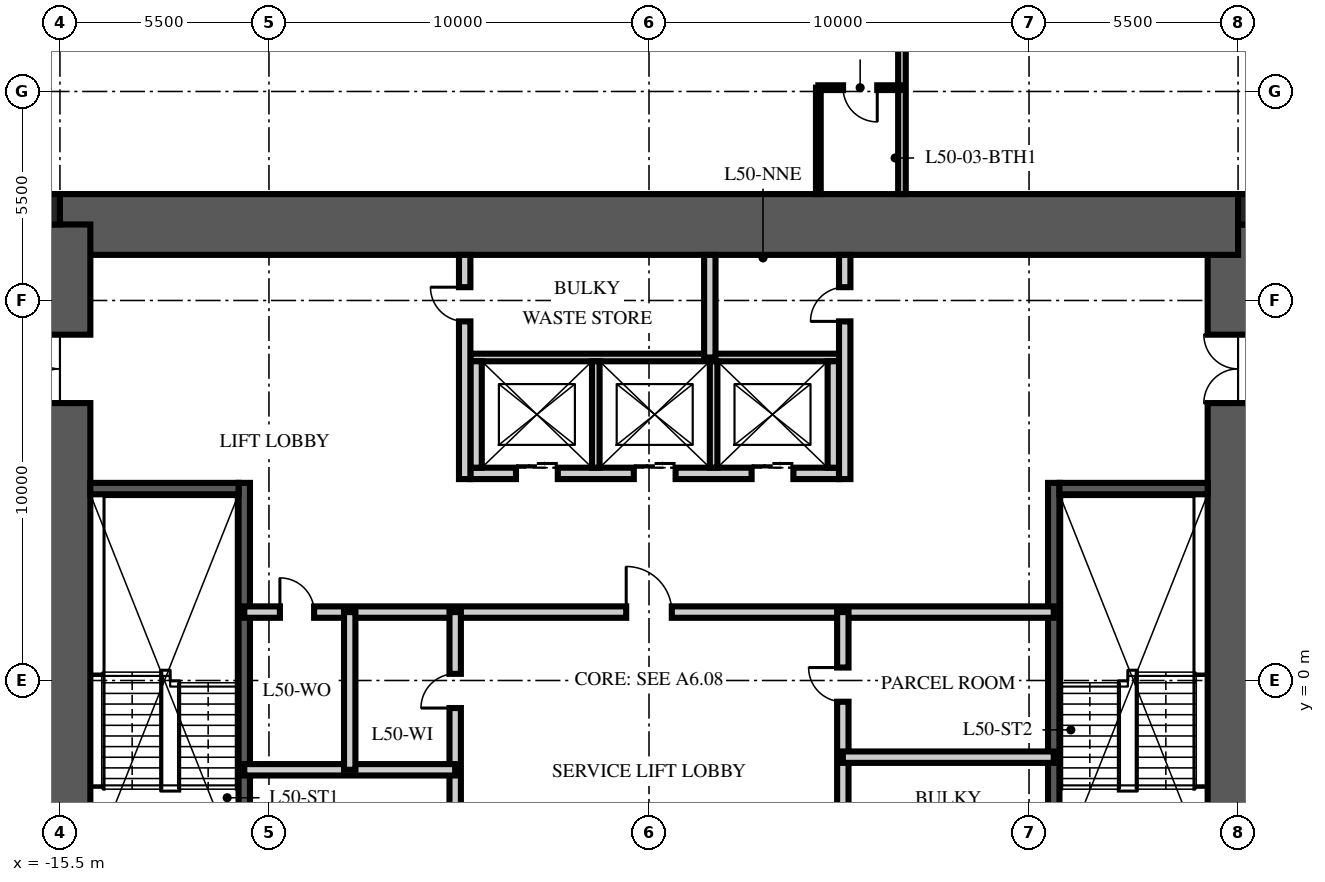
"""IFC4 building model, lengths in metres.
Left out: names, types, materials, properties, quantities, classifications, styles, units other than length and angle.
Written with IfcOpenShell. Run it as: python <this file> out.ifc"""

import sys

from ifc_helpers import new_model, si_unit, direction, frame, frame_2d, origin, origin_2d, place, context, subcontext, project, spatial, rectangle, extrude, element, fill, save


model = new_model("IFC4")
c1 = context("Model", 3, precision=1e-05, world=origin(), true_north=direction((0.0, 1.0)))
c2 = subcontext(c1, "Body", "Model", "MODEL_VIEW")
j1 = project(units=[si_unit("LENGTHUNIT", "METRE"), si_unit("PLANEANGLEUNIT", "RADIAN")], contexts=[c1])
p1 = place(None, origin())
s1 = spatial("IfcSite", under=j1, at=p1, CompositionType="ELEMENT")
p2 = place(p1, origin())
s2 = spatial("IfcBuilding", under=s1, at=p2, CompositionType="ELEMENT")
p3 = place(p2, frame((0.0, 0.0, 203.25)))
s3 = spatial("IfcBuildingStorey", under=s2, at=p3, CompositionType="ELEMENT", Elevation=203.25)
p4 = place(p3, frame((15.5, -12.0, -0.25), z_axis=(0.0, 0.0, 1.0), x_axis=(0.0, 1.0, 0.0)))
e1 = element("IfcWall", 1, at=p4, inside=s3, PredefinedType="SHEAR", context=c2, shape_type="SweptSolid", body=[
    extrude(rectangle(XDim=24.0, YDim=1.6, at=frame_2d((12.0, 0.0))), origin(), (0.0, 0.0, 1.0), 3.75),
])
p5 = place(p4, frame((3.2, 0.0, 0.25)))
e2 = element("IfcOpeningElement", 2, at=p5, cuts=e1, PredefinedType="OPENING", context=c2, shape_type="SweptSolid", body=[
    extrude(rectangle(XDim=1.2, YDim=2.1, at=frame_2d((0.6, 1.05))), frame((0.0, 0.81, 0.0), z_axis=(0.0, -1.0, 0.0), x_axis=(1.0, 0.0, 0.0)), (0.0, 0.0, 1.0), 1.62),
])
p6 = place(p4, frame((19.3, 0.0, 0.25)))
e3 = element("IfcOpeningElement", 3, at=p6, cuts=e1, PredefinedType="OPENING", context=c2, shape_type="SweptSolid", body=[
    extrude(rectangle(XDim=1.8, YDim=2.1, at=frame_2d((0.9, 1.05))), frame((0.0, 0.81, 0.0), z_axis=(0.0, -1.0, 0.0), x_axis=(1.0, 0.0, 0.0)), (0.0, 0.0, 1.0), 1.62),
])
p7 = place(p3, frame((-15.5, 12.0, -0.25), z_axis=(0.0, 0.0, 1.0), x_axis=(1.0, 0.0, 0.0)))
e4 = element("IfcWall", 4, at=p7, inside=s3, PredefinedType="SHEAR", context=c2, shape_type="SweptSolid", body=[
    extrude(rectangle(XDim=31.0, YDim=1.6, at=frame_2d((15.5, 0.0))), origin(), (0.0, 0.0, 1.0), 3.75),
])
p8 = place(p3, frame((-15.5, -12.0, -0.25), z_axis=(0.0, 0.0, 1.0), x_axis=(0.0, 1.0, 0.0)))
e5 = element("IfcWall", 5, at=p8, inside=s3, PredefinedType="SHEAR", context=c2, shape_type="SweptSolid", body=[
    extrude(rectangle(XDim=24.0, YDim=1.6, at=frame_2d((12.0, 0.0))), origin(), (0.0, 0.0, 1.0), 3.75),
])
p9 = place(p8, frame((3.2, 0.0, 0.25)))
e6 = element("IfcOpeningElement", 6, at=p9, cuts=e5, PredefinedType="OPENING", context=c2, shape_type="SweptSolid", body=[
    extrude(rectangle(XDim=1.2, YDim=2.1, at=frame_2d((0.6, 1.05))), frame((0.0, 0.81, 0.0), z_axis=(0.0, -1.0, 0.0), x_axis=(1.0, 0.0, 0.0)), (0.0, 0.0, 1.0), 1.62),
])
p10 = place(p8, frame((19.3, 0.0, 0.25)))
e7 = element("IfcOpeningElement", 7, at=p10, cuts=e5, PredefinedType="OPENING", context=c2, shape_type="SweptSolid", body=[
    extrude(rectangle(XDim=1.8, YDim=2.1, at=frame_2d((0.9, 1.05))), frame((0.0, 0.81, 0.0), z_axis=(0.0, -1.0, 0.0), x_axis=(1.0, 0.0, 0.0)), (0.0, 0.0, 1.0), 1.62),
])
for number, where, z_axis, x_axis in (
    (8, (15.9, 12.4, -0.25), (0.0, 0.0, 1.0), (1.0, 0.0, 0.0)),
    (9, (-15.9, 12.4, -0.25), (0.0, 0.0, 1.0), (1.0, 0.0, 0.0)),
):
    element("IfcColumn", number, at=place(p3, frame(where, z_axis=z_axis, x_axis=x_axis)), inside=s3, PredefinedType="COLUMN", context=c2, shape_type="SweptSolid", body=[
        extrude(rectangle(XDim=0.8, YDim=0.8, at=origin_2d()), origin(), (0.0, 0.0, 1.0), 3.75),
    ])
p11 = place(p3, frame((-10.65, -4.9, 0.0), z_axis=(0.0, 0.0, 1.0), x_axis=(0.0, 1.0, 0.0)))
e10 = element("IfcWall", 10, at=p11, inside=s3, PredefinedType="SOLIDWALL", context=c2, shape_type="SweptSolid", body=[
    extrude(rectangle(XDim=10.1, YDim=0.3, at=frame_2d((5.05, 0.0))), origin(), (0.0, 0.0, 1.0), 3.5),
])
p12 = place(p3, frame((-14.7, 5.05, 0.0), z_axis=(0.0, 0.0, 1.0), x_axis=(1.0, 0.0, 0.0)))
e11 = element("IfcWall", 11, at=p12, inside=s3, PredefinedType="SOLIDWALL", context=c2, shape_type="SweptSolid", body=[
    extrude(rectangle(XDim=3.9, YDim=0.3, at=frame_2d((1.95, 0.0))), origin(), (0.0, 0.0, 1.0), 3.5),
])
p13 = place(p3, frame((10.65, -4.9, 0.0), z_axis=(0.0, 0.0, 1.0), x_axis=(0.0, 1.0, 0.0)))
e12 = element("IfcWall", 12, at=p13, inside=s3, PredefinedType="SOLIDWALL", context=c2, shape_type="SweptSolid", body=[
    extrude(rectangle(XDim=10.1, YDim=0.3, at=frame_2d((5.05, 0.0))), origin(), (0.0, 0.0, 1.0), 3.5),
])
p14 = place(p3, frame((14.7, 5.05, 0.0), z_axis=(0.0, 0.0, 1.0), x_axis=(-1.0, 0.0, 0.0)))
e13 = element("IfcWall", 13, at=p14, inside=s3, PredefinedType="SOLIDWALL", context=c2, shape_type="SweptSolid", body=[
    extrude(rectangle(XDim=3.9, YDim=0.3, at=frame_2d((1.95, 0.0))), origin(), (0.0, 0.0, 1.0), 3.5),
])
p15 = place(p3, frame((-4.7, 5.45, 0.0), z_axis=(0.0, 0.0, 1.0), x_axis=(1.0, 0.0, 0.0)))
e14 = element("IfcWall", 14, at=p15, inside=s3, PredefinedType="PARTITIONING", context=c2, shape_type="SweptSolid", body=[
    extrude(rectangle(XDim=9.7, YDim=0.3, at=frame_2d((4.85, 0.0))), origin(), (0.0, 0.0, 1.0), 3.5),
])
p16 = place(p15, frame((1.2, 0.0, 0.0)))
e15 = element("IfcOpeningElement", 15, at=p16, cuts=e14, PredefinedType="OPENING", context=c2, shape_type="SweptSolid", body=[
    extrude(rectangle(XDim=1.1, YDim=2.1, at=frame_2d((0.55, 1.05))), frame((0.0, 0.16, 0.0), z_axis=(0.0, -1.0, 0.0), x_axis=(1.0, 0.0, 0.0)), (0.0, 0.0, 1.0), 0.32),
])
p17 = place(p15, frame((4.3, 0.0, 0.0)))
e16 = element("IfcOpeningElement", 16, at=p17, cuts=e14, PredefinedType="OPENING", context=c2, shape_type="SweptSolid", body=[
    extrude(rectangle(XDim=1.1, YDim=2.1, at=frame_2d((0.55, 1.05))), frame((0.0, 0.16, 0.0), z_axis=(0.0, -1.0, 0.0), x_axis=(1.0, 0.0, 0.0)), (0.0, 0.0, 1.0), 0.32),
])
p18 = place(p15, frame((7.4, 0.0, 0.0)))
e17 = element("IfcOpeningElement", 17, at=p18, cuts=e14, PredefinedType="OPENING", context=c2, shape_type="SweptSolid", body=[
    extrude(rectangle(XDim=1.1, YDim=2.1, at=frame_2d((0.55, 1.05))), frame((0.0, 0.16, 0.0), z_axis=(0.0, -1.0, 0.0), x_axis=(1.0, 0.0, 0.0)), (0.0, 0.0, 1.0), 0.32),
])
p19 = place(p3, frame((-4.7, 8.5, 0.0), z_axis=(0.0, 0.0, 1.0), x_axis=(1.0, 0.0, 0.0)))
e18 = element("IfcWall", 18, at=p19, inside=s3, PredefinedType="PARTITIONING", context=c2, shape_type="SweptSolid", body=[
    extrude(rectangle(XDim=9.7, YDim=0.2, at=frame_2d((4.85, 0.0))), origin(), (0.0, 0.0, 1.0), 3.5),
])
for number, where, z_axis, x_axis in (
    (19, (-4.55, 5.6, 0.0), (0.0, 0.0, 1.0), (0.0, 1.0, 0.0)),
    (20, (4.85, 5.6, 0.0), (0.0, 0.0, 1.0), (0.0, 1.0, 0.0)),
):
    element("IfcWall", number, at=place(p3, frame(where, z_axis=z_axis, x_axis=x_axis)), inside=s3, PredefinedType="PARTITIONING", context=c2, shape_type="SweptSolid", body=[
        extrude(rectangle(XDim=2.8, YDim=0.3, at=frame_2d((1.4, 0.0))), origin(), (0.0, 0.0, 1.0), 3.5),
    ])
for number, where, z_axis, x_axis in (
    (21, (-1.4, 5.6, 0.0), (0.0, 0.0, 1.0), (0.0, 1.0, 0.0)),
    (22, (1.7, 5.6, 0.0), (0.0, 0.0, 1.0), (0.0, 1.0, 0.0)),
):
    element("IfcWall", number, at=place(p3, frame(where, z_axis=z_axis, x_axis=x_axis)), inside=s3, PredefinedType="PARTITIONING", context=c2, shape_type="SweptSolid", body=[
        extrude(rectangle(XDim=2.8, YDim=0.2, at=frame_2d((1.4, 0.0))), origin(), (0.0, 0.0, 1.0), 3.5),
    ])
p20 = place(p3, frame((-10.65, 1.8, 0.0), z_axis=(0.0, 0.0, 1.0), x_axis=(1.0, 0.0, 0.0)))
e23 = element("IfcWall", 23, at=p20, inside=s3, PredefinedType="PARTITIONING", context=c2, shape_type="SweptSolid", body=[
    extrude(rectangle(XDim=21.3, YDim=0.3, at=frame_2d((10.65, 0.0))), origin(), (0.0, 0.0, 1.0), 3.5),
])
p21 = place(p20, frame((10.05, 0.0, 0.0)))
e24 = element("IfcOpeningElement", 24, at=p21, cuts=e23, PredefinedType="OPENING", context=c2, shape_type="SweptSolid", body=[
    extrude(rectangle(XDim=1.2, YDim=2.1, at=frame_2d((0.6, 1.05))), frame((0.0, 0.16, 0.0), z_axis=(0.0, -1.0, 0.0), x_axis=(1.0, 0.0, 0.0)), (0.0, 0.0, 1.0), 0.32),
])
p22 = place(p20, frame((0.938, 0.0, 0.0)))
e25 = element("IfcOpeningElement", 25, at=p22, cuts=e23, PredefinedType="OPENING", context=c2, shape_type="SweptSolid", body=[
    extrude(rectangle(XDim=0.9, YDim=2.1, at=frame_2d((0.45, 1.05))), frame((0.0, 0.16, 0.0), z_axis=(0.0, -1.0, 0.0), x_axis=(1.0, 0.0, 0.0)), (0.0, 0.0, 1.0), 0.32),
])
p23 = place(p3, frame((-5.1, -6.65, 0.0), z_axis=(0.0, 0.0, 1.0), x_axis=(0.0, 1.0, 0.0)))
e26 = element("IfcWall", 26, at=p23, inside=s3, PredefinedType="PARTITIONING", context=c2, shape_type="SweptSolid", body=[
    extrude(rectangle(XDim=8.45, YDim=0.3, at=frame_2d((4.225, 0.0))), origin(), (0.0, 0.0, 1.0), 3.5),
])
p24 = place(p23, frame((1.7, 0.0, 0.0)))
e27 = element("IfcOpeningElement", 27, at=p24, cuts=e26, PredefinedType="OPENING", context=c2, shape_type="SweptSolid", body=[
    extrude(rectangle(XDim=0.9, YDim=2.1, at=frame_2d((0.45, 1.05))), frame((0.0, 0.16, 0.0), z_axis=(0.0, -1.0, 0.0), x_axis=(1.0, 0.0, 0.0)), (0.0, 0.0, 1.0), 0.32),
])
p25 = place(p23, frame((5.925, 0.0, 0.0)))
e28 = element("IfcOpeningElement", 28, at=p25, cuts=e26, PredefinedType="OPENING", context=c2, shape_type="SweptSolid", body=[
    extrude(rectangle(XDim=0.9, YDim=2.1, at=frame_2d((0.45, 1.05))), frame((0.0, 0.16, 0.0), z_axis=(0.0, -1.0, 0.0), x_axis=(1.0, 0.0, 0.0)), (0.0, 0.0, 1.0), 0.32),
])
p26 = place(p3, frame((5.1, -6.65, 0.0), z_axis=(0.0, 0.0, 1.0), x_axis=(0.0, 1.0, 0.0)))
e29 = element("IfcWall", 29, at=p26, inside=s3, PredefinedType="PARTITIONING", context=c2, shape_type="SweptSolid", body=[
    extrude(rectangle(XDim=8.45, YDim=0.3, at=frame_2d((4.225, 0.0))), origin(), (0.0, 0.0, 1.0), 3.5),
])
p27 = place(p26, frame((1.866, 0.0, 0.0)))
e30 = element("IfcOpeningElement", 30, at=p27, cuts=e29, PredefinedType="OPENING", context=c2, shape_type="SweptSolid", body=[
    extrude(rectangle(XDim=0.9, YDim=2.1, at=frame_2d((0.45, 1.05))), frame((0.0, 0.16, 0.0), z_axis=(0.0, -1.0, 0.0), x_axis=(1.0, 0.0, 0.0)), (0.0, 0.0, 1.0), 0.32),
])
p28 = place(p26, frame((6.091, 0.0, 0.0)))
e31 = element("IfcOpeningElement", 31, at=p28, cuts=e29, PredefinedType="OPENING", context=c2, shape_type="SweptSolid", body=[
    extrude(rectangle(XDim=0.9, YDim=2.1, at=frame_2d((0.45, 1.05))), frame((0.0, 0.16, 0.0), z_axis=(0.0, -1.0, 0.0), x_axis=(1.0, 0.0, 0.0)), (0.0, 0.0, 1.0), 0.32),
])
p29 = place(p3, frame((-10.65, -2.35, 0.0), z_axis=(0.0, 0.0, 1.0), x_axis=(1.0, 0.0, 0.0)))
e32 = element("IfcWall", 32, at=p29, inside=s3, PredefinedType="PARTITIONING", context=c2, shape_type="SweptSolid", body=[
    extrude(rectangle(XDim=5.55, YDim=0.3, at=frame_2d((2.775, 0.0))), origin(), (0.0, 0.0, 1.0), 3.5),
])
p30 = place(p3, frame((-7.875, -2.35, 0.0), z_axis=(0.0, 0.0, 1.0), x_axis=(0.0, 1.0, 0.0)))
e33 = element("IfcWall", 33, at=p30, inside=s3, PredefinedType="PARTITIONING", context=c2, shape_type="SweptSolid", body=[
    extrude(rectangle(XDim=4.15, YDim=0.3, at=frame_2d((2.075, 0.0))), origin(), (0.0, 0.0, 1.0), 3.5),
])
p31 = place(p3, frame((10.65, -2.018, 0.0), z_axis=(0.0, 0.0, 1.0), x_axis=(-1.0, 0.0, 0.0)))
e34 = element("IfcWall", 34, at=p31, inside=s3, PredefinedType="PARTITIONING", context=c2, shape_type="SweptSolid", body=[
    extrude(rectangle(XDim=5.55, YDim=0.3, at=frame_2d((2.775, 0.0))), origin(), (0.0, 0.0, 1.0), 3.5),
])
p32 = place(p3, frame((-4.85, 5.3, 0.0), z_axis=(0.0, 0.0, 1.0), x_axis=(0.0, 1.0, 0.0)))
e35 = element("IfcWall", 35, at=p32, inside=s3, PredefinedType="PARTITIONING", context=c2, shape_type="SweptSolid", body=[
    extrude(rectangle(XDim=5.9, YDim=0.3, at=frame_2d((2.95, 0.0))), origin(), (0.0, 0.0, 1.0), 3.5),
])
p33 = place(p32, frame((4.15, 0.0, 0.0)))
e36 = element("IfcOpeningElement", 36, at=p33, cuts=e35, PredefinedType="OPENING", context=c2, shape_type="SweptSolid", body=[
    extrude(rectangle(XDim=0.9, YDim=2.1, at=frame_2d((0.45, 1.05))), frame((0.0, 0.16, 0.0), z_axis=(0.0, -1.0, 0.0), x_axis=(1.0, 0.0, 0.0)), (0.0, 0.0, 1.0), 0.32),
])
p34 = place(p3, frame((5.15, 5.3, 0.0), z_axis=(0.0, 0.0, 1.0), x_axis=(0.0, 1.0, 0.0)))
e37 = element("IfcWall", 37, at=p34, inside=s3, PredefinedType="PARTITIONING", context=c2, shape_type="SweptSolid", body=[
    extrude(rectangle(XDim=5.9, YDim=0.3, at=frame_2d((2.95, 0.0))), origin(), (0.0, 0.0, 1.0), 3.5),
])
p35 = place(p34, frame((4.15, 0.0, 0.0)))
e38 = element("IfcOpeningElement", 38, at=p35, cuts=e37, PredefinedType="OPENING", context=c2, shape_type="SweptSolid", body=[
    extrude(rectangle(XDim=0.9, YDim=2.1, at=frame_2d((0.45, 1.05))), frame((0.0, 0.16, 0.0), z_axis=(0.0, -1.0, 0.0), x_axis=(1.0, 0.0, 0.0)), (0.0, 0.0, 1.0), 0.32),
])
p36 = place(p3, frame((1.6, 8.5, 0.0), z_axis=(0.0, 0.0, 1.0), x_axis=(0.0, 1.0, 0.0)))
e39 = element("IfcWall", 39, at=p36, inside=s3, PredefinedType="PARTITIONING", context=c2, shape_type="SweptSolid", body=[
    extrude(rectangle(XDim=2.7, YDim=0.3, at=frame_2d((1.35, 0.0))), origin(), (0.0, 0.0, 1.0), 3.5),
])
p37 = place(p3, frame((6.656, 12.8, 0.0), z_axis=(0.0, 0.0, 1.0), x_axis=(0.0, 1.0, 0.0)))
e40 = element("IfcWall", 40, at=p37, inside=s3, PredefinedType="PARTITIONING", context=c2, shape_type="SweptSolid", body=[
    extrude(rectangle(XDim=13.65, YDim=0.2, at=frame_2d((6.825, 0.0))), origin(), (0.0, 0.0, 1.0), 2.91),
])
p38 = place(p3, frame((6.656, 15.6, 0.0), z_axis=(0.0, 0.0, 1.0), x_axis=(-1.0, 0.0, 0.0)))
e41 = element("IfcWall", 41, at=p38, inside=s3, PredefinedType="PARTITIONING", context=c2, shape_type="SweptSolid", body=[
    extrude(rectangle(XDim=2.2, YDim=0.125, at=frame_2d((1.1, 0.0))), origin(), (0.0, 0.0, 1.0), 3.5),
])
p39 = place(p38, frame((0.65, 0.0, 0.0)))
e42 = element("IfcOpeningElement", 42, at=p39, cuts=e41, PredefinedType="OPENING", context=c2, shape_type="SweptSolid", body=[
    extrude(rectangle(XDim=0.9, YDim=2.1, at=frame_2d((0.45, 1.05))), frame((0.0, 0.073, 0.0), z_axis=(0.0, -1.0, 0.0), x_axis=(1.0, 0.0, 0.0)), (0.0, 0.0, 1.0), 0.145),
])
p40 = place(p3, frame((4.456, 12.8, 0.0), z_axis=(0.0, 0.0, 1.0), x_axis=(0.0, 1.0, 0.0)))
e43 = element("IfcWall", 43, at=p40, inside=s3, PredefinedType="PARTITIONING", context=c2, shape_type="SweptSolid", body=[
    extrude(rectangle(XDim=2.8, YDim=0.125, at=frame_2d((1.4, 0.0))), origin(), (0.0, 0.0, 1.0), 3.5),
])
p41 = place(p10, origin())
e44 = element("IfcDoor", 44, at=p41, inside=s3, OperationType="DOUBLE_DOOR_SINGLE_SWING", PredefinedType="DOOR", context=c2, shape_type="SweptSolid", body=[
    extrude(rectangle(XDim=1.8, YDim=2.1, at=frame_2d((0.9, 1.05))), frame((0.0, 0.025, 0.0), z_axis=(0.0, -1.0, 0.0), x_axis=(1.0, 0.0, 0.0)), (0.0, 0.0, 1.0), 0.05),
])
fill(e7, e44)
p42 = place(p6, origin())
e45 = element("IfcDoor", 45, at=p42, inside=s3, OperationType="DOUBLE_DOOR_SINGLE_SWING", PredefinedType="DOOR", context=c2, shape_type="SweptSolid", body=[
    extrude(rectangle(XDim=1.8, YDim=2.1, at=frame_2d((0.9, 1.05))), frame((0.0, 0.025, 0.0), z_axis=(0.0, -1.0, 0.0), x_axis=(1.0, 0.0, 0.0)), (0.0, 0.0, 1.0), 0.05),
])
fill(e3, e45)
p43 = place(p16, origin())
e46 = element("IfcDoor", 46, at=p43, inside=s3, OperationType="DOUBLE_DOOR_SLIDING", PredefinedType="DOOR", context=c2, shape_type="SweptSolid", body=[
    extrude(rectangle(XDim=1.1, YDim=2.1, at=frame_2d((0.55, 1.05))), frame((0.0, 0.025, 0.0), z_axis=(0.0, -1.0, 0.0), x_axis=(1.0, 0.0, 0.0)), (0.0, 0.0, 1.0), 0.05),
])
fill(e15, e46)
p44 = place(p17, origin())
e47 = element("IfcDoor", 47, at=p44, inside=s3, OperationType="DOUBLE_DOOR_SLIDING", PredefinedType="DOOR", context=c2, shape_type="SweptSolid", body=[
    extrude(rectangle(XDim=1.1, YDim=2.1, at=frame_2d((0.55, 1.05))), frame((0.0, 0.025, 0.0), z_axis=(0.0, -1.0, 0.0), x_axis=(1.0, 0.0, 0.0)), (0.0, 0.0, 1.0), 0.05),
])
fill(e16, e47)
p45 = place(p18, origin())
e48 = element("IfcDoor", 48, at=p45, inside=s3, OperationType="DOUBLE_DOOR_SLIDING", PredefinedType="DOOR", context=c2, shape_type="SweptSolid", body=[
    extrude(rectangle(XDim=1.1, YDim=2.1, at=frame_2d((0.55, 1.05))), frame((0.0, 0.025, 0.0), z_axis=(0.0, -1.0, 0.0), x_axis=(1.0, 0.0, 0.0)), (0.0, 0.0, 1.0), 0.05),
])
fill(e17, e48)
p46 = place(p21, origin())
e49 = element("IfcDoor", 49, at=p46, inside=s3, OperationType="SINGLE_SWING_LEFT", PredefinedType="DOOR", context=c2, shape_type="SweptSolid", body=[
    extrude(rectangle(XDim=1.2, YDim=2.1, at=frame_2d((0.6, 1.05))), frame((0.0, 0.025, 0.0), z_axis=(0.0, -1.0, 0.0), x_axis=(1.0, 0.0, 0.0)), (0.0, 0.0, 1.0), 0.05),
])
fill(e24, e49)
p47 = place(p25, origin())
e50 = element("IfcDoor", 50, at=p47, inside=s3, OperationType="SINGLE_SWING_LEFT", PredefinedType="DOOR", context=c2, shape_type="SweptSolid", body=[
    extrude(rectangle(XDim=0.9, YDim=2.1, at=frame_2d((0.45, 1.05))), frame((0.0, 0.025, 0.0), z_axis=(0.0, -1.0, 0.0), x_axis=(1.0, 0.0, 0.0)), (0.0, 0.0, 1.0), 0.05),
])
fill(e28, e50)
p48 = place(p22, origin())
e51 = element("IfcDoor", 51, at=p48, inside=s3, OperationType="SINGLE_SWING_LEFT", PredefinedType="DOOR", context=c2, shape_type="SweptSolid", body=[
    extrude(rectangle(XDim=0.9, YDim=2.1, at=frame_2d((0.45, 1.05))), frame((0.0, 0.025, 0.0), z_axis=(0.0, -1.0, 0.0), x_axis=(1.0, 0.0, 0.0)), (0.0, 0.0, 1.0), 0.05),
])
fill(e25, e51)
p49 = place(p28, origin())
e52 = element("IfcDoor", 52, at=p49, inside=s3, OperationType="SINGLE_SWING_RIGHT", PredefinedType="DOOR", context=c2, shape_type="SweptSolid", body=[
    extrude(rectangle(XDim=0.9, YDim=2.1, at=frame_2d((0.45, 1.05))), frame((0.0, 0.025, 0.0), z_axis=(0.0, -1.0, 0.0), x_axis=(1.0, 0.0, 0.0)), (0.0, 0.0, 1.0), 0.05),
])
fill(e31, e52)
p50 = place(p33, origin())
e53 = element("IfcDoor", 53, at=p50, inside=s3, OperationType="SINGLE_SWING_RIGHT", PredefinedType="DOOR", context=c2, shape_type="SweptSolid", body=[
    extrude(rectangle(XDim=0.9, YDim=2.1, at=frame_2d((0.45, 1.05))), frame((0.0, 0.025, 0.0), z_axis=(0.0, -1.0, 0.0), x_axis=(1.0, 0.0, 0.0)), (0.0, 0.0, 1.0), 0.05),
])
fill(e36, e53)
p51 = place(p35, origin())
e54 = element("IfcDoor", 54, at=p51, inside=s3, OperationType="SINGLE_SWING_LEFT", PredefinedType="DOOR", context=c2, shape_type="SweptSolid", body=[
    extrude(rectangle(XDim=0.9, YDim=2.1, at=frame_2d((0.45, 1.05))), frame((0.0, 0.025, 0.0), z_axis=(0.0, -1.0, 0.0), x_axis=(1.0, 0.0, 0.0)), (0.0, 0.0, 1.0), 0.05),
])
fill(e38, e54)
p52 = place(p39, origin())
e55 = element("IfcDoor", 55, at=p52, inside=s3, OperationType="SINGLE_SWING_LEFT", PredefinedType="DOOR", context=c2, shape_type="SweptSolid", body=[
    extrude(rectangle(XDim=0.9, YDim=2.1, at=frame_2d((0.45, 1.05))), frame((0.0, 0.025, 0.0), z_axis=(0.0, -1.0, 0.0), x_axis=(1.0, 0.0, 0.0)), (0.0, 0.0, 1.0), 0.05),
])
fill(e42, e55)
save(model, sys.argv[1])
